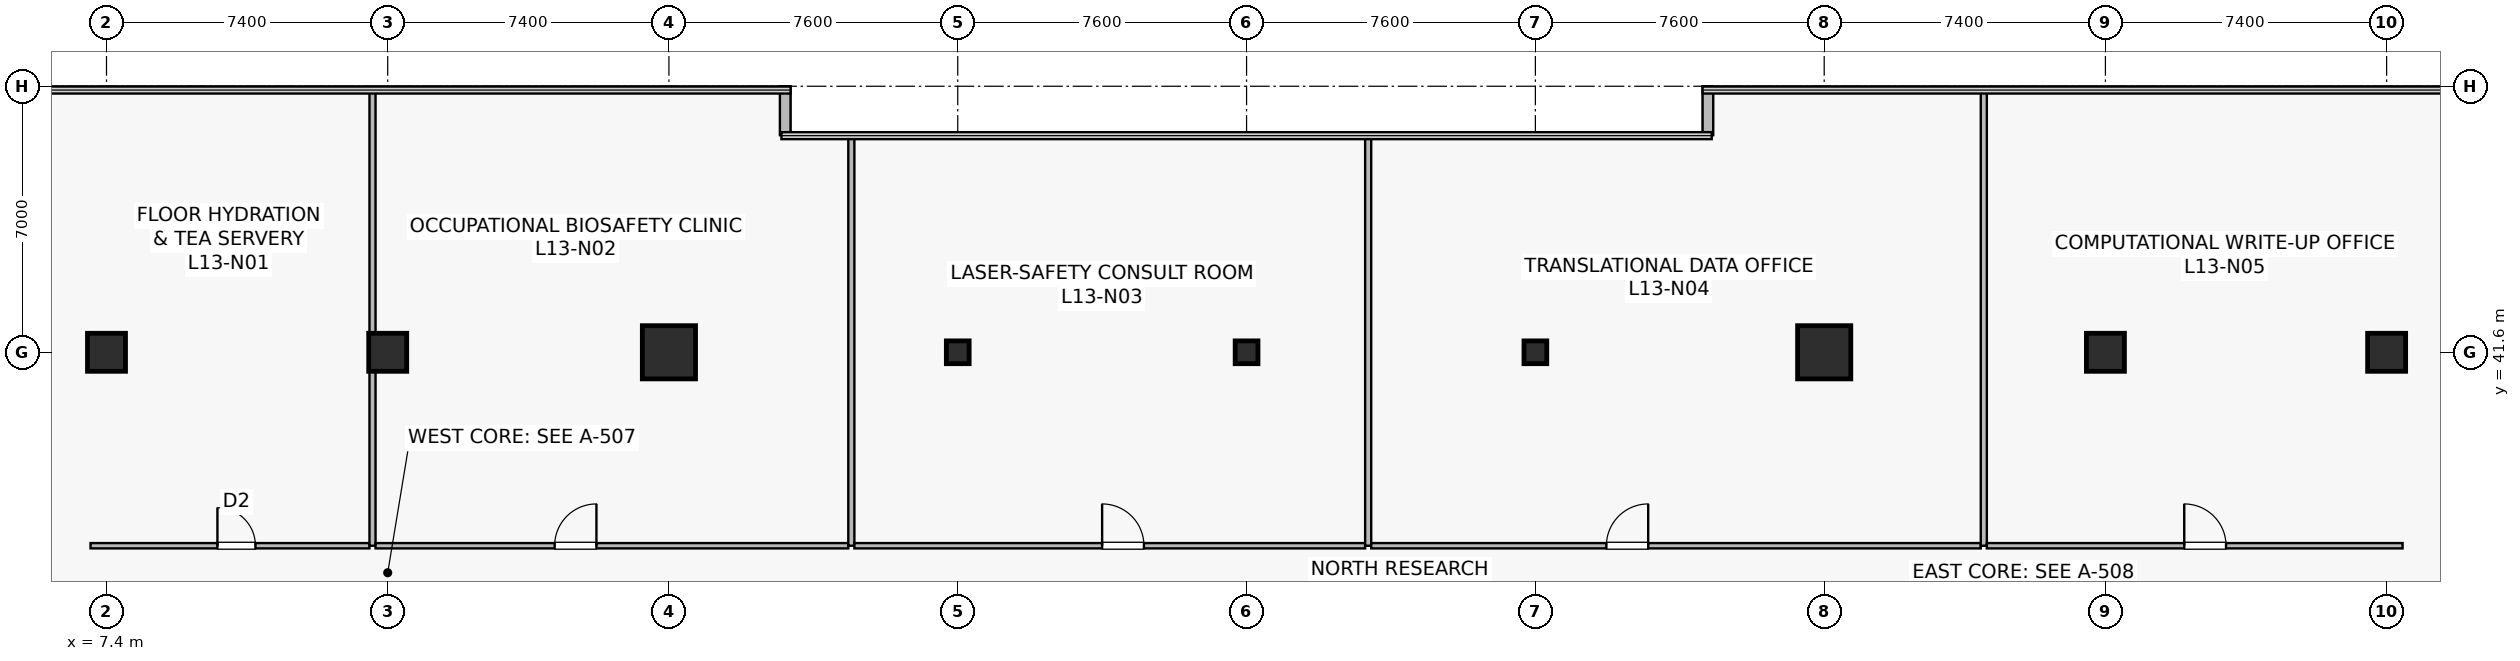
"""IFC4 building model, lengths in metres.
Left out: names, types, materials, properties, quantities, classifications, styles, units other than length and angle.
Written with IfcOpenShell. Run it as: python <this file> out.ifc"""

import sys

from ifc_helpers import new_model, si_unit, direction, frame, frame_2d, origin, origin_2d, place, context, subcontext, project, spatial, rectangle, hollow_rectangle, extrude, source, transform, mapped, element, fill, save


model = new_model("IFC4")
c1 = context("Model", 3, precision=1e-05, world=origin(), true_north=direction((0.0, 1.0)))
c2 = subcontext(c1, "Body", "Model", "MODEL_VIEW")
j1 = project(units=[si_unit("LENGTHUNIT", "METRE"), si_unit("PLANEANGLEUNIT", "RADIAN")], contexts=[c1])
p1 = place(None, origin())
s1 = spatial("IfcSite", under=j1, at=p1, CompositionType="ELEMENT")
p2 = place(p1, origin())
s2 = spatial("IfcBuilding", under=s1, at=p2, CompositionType="ELEMENT")
p3 = place(p2, frame((0.0, 0.0, 53.9)))
s3 = spatial("IfcBuildingStorey", under=s2, at=p3, CompositionType="ELEMENT", Elevation=53.9)
m1 = source(origin(), c2, "Body", "SweptSolid", [
    extrude(rectangle(XDim=1.0, YDim=1.0, at=origin_2d()), origin(), (0.0, 0.0, 1.0), 4.1),
])
p4 = place(p3, frame((14.8, 41.6, 0.0), z_axis=(0.0, 0.0, 1.0), x_axis=(1.0, 0.0, 0.0)))
e1 = element("IfcColumn", 1, at=p4, inside=s3, PredefinedType="COLUMN", context=c2, shape_type="MappedRepresentation", body=[
    mapped(m1, transform((0.0, 0.0, 0.0), scale=1.0)),
])
m2 = source(origin(), c2, "Body", "SweptSolid", [
    extrude(rectangle(XDim=1.4, YDim=1.4, at=origin_2d()), origin(), (0.0, 0.0, 1.0), 4.1),
])
for number, where, z_axis, x_axis in (
    (2, (22.2, 41.6, 0.0), (0.0, 0.0, 1.0), (1.0, 0.0, 0.0)),
    (3, (52.6, 41.6, 0.0), (0.0, 0.0, 1.0), (1.0, 0.0, 0.0)),
):
    element("IfcColumn", number, at=place(p3, frame(where, z_axis=z_axis, x_axis=x_axis)), inside=s3, PredefinedType="COLUMN", context=c2, shape_type="MappedRepresentation", body=[
        mapped(m2, transform((0.0, 0.0, 0.0), scale=1.0)),
    ])
for number, where, z_axis, x_axis in (
    (4, (60.0, 41.6, 0.0), (0.0, 0.0, 1.0), (1.0, 0.0, 0.0)),
    (5, (7.4, 41.6, 0.0), (0.0, 0.0, 1.0), (1.0, 0.0, 0.0)),
    (6, (67.4, 41.6, 0.0), (0.0, 0.0, 1.0), (1.0, 0.0, 0.0)),
):
    element("IfcColumn", number, at=place(p3, frame(where, z_axis=z_axis, x_axis=x_axis)), inside=s3, PredefinedType="COLUMN", context=c2, shape_type="MappedRepresentation", body=[
        mapped(m1, transform((0.0, 0.0, 0.0), scale=1.0)),
    ])
m3 = source(origin(), c2, "Body", "SweptSolid", [
    extrude(hollow_rectangle(XDim=0.6, YDim=0.6, WallThickness=0.028, at=origin_2d()), origin(), (0.0, 0.0, 1.0), 4.1),
])
for number, where, z_axis, x_axis in (
    (7, (29.8, 41.6, 0.0), (0.0, 0.0, 1.0), (1.0, 0.0, 0.0)),
    (8, (37.4, 41.6, 0.0), (0.0, 0.0, 1.0), (1.0, 0.0, 0.0)),
    (9, (45.0, 41.6, 0.0), (0.0, 0.0, 1.0), (1.0, 0.0, 0.0)),
):
    element("IfcColumn", number, at=place(p3, frame(where, z_axis=z_axis, x_axis=x_axis)), inside=s3, PredefinedType="COLUMN", context=c2, shape_type="MappedRepresentation", body=[
        mapped(m3, transform((0.0, 0.0, 0.0), scale=1.0)),
    ])
for number, where, z_axis, x_axis in (
    (10, (49.54, 48.6, 0.0), (0.0, 0.0, 1.0), (0.0, -1.0, 0.0)),
    (11, (25.26, 47.312, 0.0), (0.0, 0.0, 1.0), (0.0, 1.0, 0.0)),
):
    element("IfcWall", number, at=place(p3, frame(where, z_axis=z_axis, x_axis=x_axis)), inside=s3, PredefinedType="STANDARD", context=c2, shape_type="SweptSolid", body=[
        extrude(rectangle(XDim=1.288, YDim=0.28, at=frame_2d((0.644, 0.0))), origin(), (0.0, 0.0, 1.0), 3.78),
    ])
p5 = place(p3, frame((6.98, 36.51, 0.0), z_axis=(0.0, 0.0, 1.0), x_axis=(1.0, 0.0, 0.0)))
e12 = element("IfcWall", 12, at=p5, inside=s3, PredefinedType="PARTITIONING", context=c2, shape_type="SweptSolid", body=[
    extrude(rectangle(XDim=7.34, YDim=0.14, at=frame_2d((3.67, 0.0))), origin(), (0.0, 0.0, 1.0), 3.265),
])
p6 = place(p5, frame((3.339, 0.0, 0.0)))
e13 = element("IfcOpeningElement", 13, at=p6, cuts=e12, PredefinedType="OPENING", context=c2, shape_type="SweptSolid", body=[
    extrude(rectangle(XDim=1.0, YDim=2.15, at=frame_2d((0.5, 1.075))), frame((0.0, 0.08, 0.0), z_axis=(0.0, -1.0, 0.0), x_axis=(1.0, 0.0, 0.0)), (0.0, 0.0, 1.0), 0.16),
])
p7 = place(p3, frame((14.4, 36.51, 0.0), z_axis=(0.0, 0.0, 1.0), x_axis=(0.0, 1.0, 0.0)))
e14 = element("IfcWall", 14, at=p7, inside=s3, PredefinedType="PARTITIONING", context=c2, shape_type="SweptSolid", body=[
    extrude(rectangle(XDim=11.98, YDim=0.16, at=frame_2d((5.99, 0.0))), origin(), (0.0, 0.0, 1.0), 3.015),
])
p8 = place(p3, frame((14.48, 36.51, 0.0), z_axis=(0.0, 0.0, 1.0), x_axis=(1.0, 0.0, 0.0)))
e15 = element("IfcWall", 15, at=p8, inside=s3, PredefinedType="PARTITIONING", context=c2, shape_type="SweptSolid", body=[
    extrude(rectangle(XDim=12.44, YDim=0.14, at=frame_2d((6.22, 0.0))), origin(), (0.0, 0.0, 1.0), 3.065),
])
p9 = place(p8, frame((4.712, 0.0, 0.0)))
e16 = element("IfcOpeningElement", 16, at=p9, cuts=e15, PredefinedType="OPENING", context=c2, shape_type="SweptSolid", body=[
    extrude(rectangle(XDim=1.1, YDim=2.18, at=frame_2d((0.55, 1.09))), frame((0.0, 0.08, 0.0), z_axis=(0.0, -1.0, 0.0), x_axis=(1.0, 0.0, 0.0)), (0.0, 0.0, 1.0), 0.16),
])
p10 = place(p3, frame((27.0, 36.51, 0.0), z_axis=(0.0, 0.0, 1.0), x_axis=(0.0, 1.0, 0.0)))
e17 = element("IfcWall", 17, at=p10, inside=s3, PredefinedType="PARTITIONING", context=c2, shape_type="SweptSolid", body=[
    extrude(rectangle(XDim=10.78, YDim=0.16, at=frame_2d((5.39, 0.0))), origin(), (0.0, 0.0, 1.0), 3.015),
])
p11 = place(p3, frame((27.08, 36.51, 0.0), z_axis=(0.0, 0.0, 1.0), x_axis=(1.0, 0.0, 0.0)))
e18 = element("IfcWall", 18, at=p11, inside=s3, PredefinedType="PARTITIONING", context=c2, shape_type="SweptSolid", body=[
    extrude(rectangle(XDim=13.44, YDim=0.14, at=frame_2d((6.72, 0.0))), origin(), (0.0, 0.0, 1.0), 3.065),
])
p12 = place(p11, frame((6.519, 0.0, 0.0)))
e19 = element("IfcOpeningElement", 19, at=p12, cuts=e18, PredefinedType="OPENING", context=c2, shape_type="SweptSolid", body=[
    extrude(rectangle(XDim=1.1, YDim=2.18, at=frame_2d((0.55, 1.09))), frame((0.0, 0.08, 0.0), z_axis=(0.0, -1.0, 0.0), x_axis=(1.0, 0.0, 0.0)), (0.0, 0.0, 1.0), 0.16),
])
p13 = place(p3, frame((40.6, 36.51, 0.0), z_axis=(0.0, 0.0, 1.0), x_axis=(0.0, 1.0, 0.0)))
e20 = element("IfcWall", 20, at=p13, inside=s3, PredefinedType="PARTITIONING", context=c2, shape_type="SweptSolid", body=[
    extrude(rectangle(XDim=10.78, YDim=0.16, at=frame_2d((5.39, 0.0))), origin(), (0.0, 0.0, 1.0), 3.015),
])
p14 = place(p3, frame((40.68, 36.51, 0.0), z_axis=(0.0, 0.0, 1.0), x_axis=(1.0, 0.0, 0.0)))
e21 = element("IfcWall", 21, at=p14, inside=s3, PredefinedType="PARTITIONING", context=c2, shape_type="SweptSolid", body=[
    extrude(rectangle(XDim=16.04, YDim=0.14, at=frame_2d((8.02, 0.0))), origin(), (0.0, 0.0, 1.0), 3.065),
])
p15 = place(p14, frame((6.188, 0.0, 0.0)))
e22 = element("IfcOpeningElement", 22, at=p15, cuts=e21, PredefinedType="OPENING", context=c2, shape_type="SweptSolid", body=[
    extrude(rectangle(XDim=1.1, YDim=2.18, at=frame_2d((0.55, 1.09))), frame((0.0, 0.08, 0.0), z_axis=(0.0, -1.0, 0.0), x_axis=(1.0, 0.0, 0.0)), (0.0, 0.0, 1.0), 0.16),
])
p16 = place(p3, frame((56.8, 36.51, 0.0), z_axis=(0.0, 0.0, 1.0), x_axis=(0.0, 1.0, 0.0)))
e23 = element("IfcWall", 23, at=p16, inside=s3, PredefinedType="PARTITIONING", context=c2, shape_type="SweptSolid", body=[
    extrude(rectangle(XDim=11.98, YDim=0.16, at=frame_2d((5.99, 0.0))), origin(), (0.0, 0.0, 1.0), 3.015),
])
p17 = place(p3, frame((56.88, 36.51, 0.0), z_axis=(0.0, 0.0, 1.0), x_axis=(1.0, 0.0, 0.0)))
e24 = element("IfcWall", 24, at=p17, inside=s3, PredefinedType="PARTITIONING", context=c2, shape_type="SweptSolid", body=[
    extrude(rectangle(XDim=10.94, YDim=0.14, at=frame_2d((5.47, 0.0))), origin(), (0.0, 0.0, 1.0), 3.065),
])
p18 = place(p17, frame((5.194, 0.0, 0.0)))
e25 = element("IfcOpeningElement", 25, at=p18, cuts=e24, PredefinedType="OPENING", context=c2, shape_type="SweptSolid", body=[
    extrude(rectangle(XDim=1.1, YDim=2.18, at=frame_2d((0.55, 1.09))), frame((0.0, 0.08, 0.0), z_axis=(0.0, -1.0, 0.0), x_axis=(1.0, 0.0, 0.0)), (0.0, 0.0, 1.0), 0.16),
])
m4 = source(origin(), c2, "Body", "SweptSolid", [
    extrude(rectangle(XDim=1.0, YDim=2.15, at=frame_2d((0.5, 1.075))), frame((0.0, 0.025, 0.0), z_axis=(0.0, -1.0, 0.0), x_axis=(1.0, 0.0, 0.0)), (0.0, 0.0, 1.0), 0.05),
])
p19 = place(p6, origin())
e26 = element("IfcDoor", 26, at=p19, inside=s3, OperationType="SINGLE_SWING_LEFT", PredefinedType="DOOR", context=c2, shape_type="MappedRepresentation", body=[
    mapped(m4, transform((0.0, 0.0, 0.0), scale=1.0)),
])
fill(e13, e26)
m5 = source(origin(), c2, "Body", "SweptSolid", [
    extrude(rectangle(XDim=1.1, YDim=2.18, at=frame_2d((0.55, 1.09))), frame((0.0, 0.025, 0.0), z_axis=(0.0, -1.0, 0.0), x_axis=(1.0, 0.0, 0.0)), (0.0, 0.0, 1.0), 0.05),
])
p20 = place(p9, origin())
e27 = element("IfcDoor", 27, at=p20, inside=s3, OperationType="SINGLE_SWING_RIGHT", PredefinedType="DOOR", context=c2, shape_type="MappedRepresentation", body=[
    mapped(m5, transform((0.0, 0.0, 0.0), scale=1.0)),
])
fill(e16, e27)
p21 = place(p12, origin())
e28 = element("IfcDoor", 28, at=p21, inside=s3, OperationType="SINGLE_SWING_LEFT", PredefinedType="DOOR", context=c2, shape_type="MappedRepresentation", body=[
    mapped(m5, transform((0.0, 0.0, 0.0), scale=1.0)),
])
fill(e19, e28)
p22 = place(p15, origin())
e29 = element("IfcDoor", 29, at=p22, inside=s3, OperationType="SINGLE_SWING_RIGHT", PredefinedType="DOOR", context=c2, shape_type="MappedRepresentation", body=[
    mapped(m5, transform((0.0, 0.0, 0.0), scale=1.0)),
])
fill(e22, e29)
p23 = place(p18, origin())
e30 = element("IfcDoor", 30, at=p23, inside=s3, OperationType="SINGLE_SWING_LEFT", PredefinedType="DOOR", context=c2, shape_type="MappedRepresentation", body=[
    mapped(m5, transform((0.0, 0.0, 0.0), scale=1.0)),
])
fill(e25, e30)
save(model, sys.argv[1])
